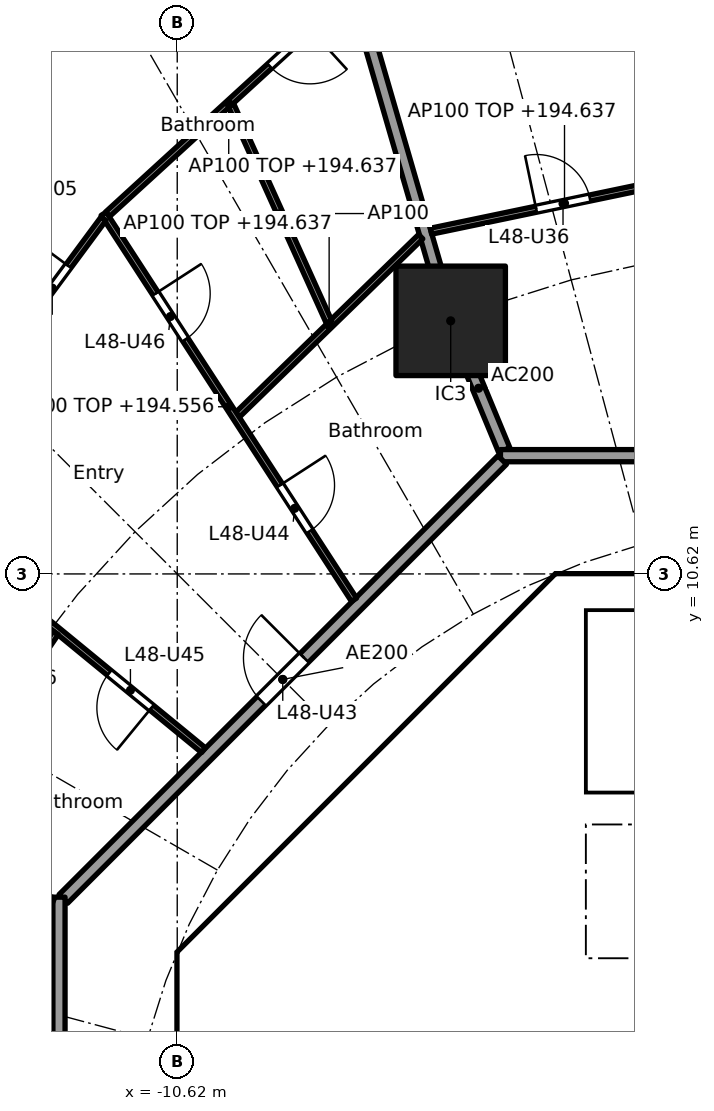
"""IFC4 building model, lengths in metres.
Left out: names, types, materials, properties, quantities, classifications, styles, units other than length and angle.
Written with IfcOpenShell. Run it as: python <this file> out.ifc"""

import sys

from ifc_helpers import new_model, si_unit, direction, frame, frame_2d, origin, origin_2d, place, context, subcontext, project, spatial, polyline, rectangle, outline, extrude, element, fill, save


model = new_model("IFC4")
c1 = context("Model", 3, precision=1e-05, world=origin(), true_north=direction((0.0, 1.0)))
c2 = subcontext(c1, "Body", "Model", "MODEL_VIEW")
j1 = project(units=[si_unit("LENGTHUNIT", "METRE"), si_unit("PLANEANGLEUNIT", "RADIAN")], contexts=[c1])
p1 = place(None, origin())
s1 = spatial("IfcSite", under=j1, at=p1, CompositionType="ELEMENT")
p2 = place(p1, origin())
s2 = spatial("IfcBuilding", under=s1, at=p2, CompositionType="ELEMENT")
p3 = place(p2, frame((0.0, 0.0, 191.8)))
s3 = spatial("IfcBuildingStorey", under=s2, at=p3, CompositionType="ELEMENT", Elevation=191.8)
p4 = place(p3, frame((-6.123, 14.782, 0.0), z_axis=(0.0, 0.0, 1.0), x_axis=(1.0, 0.0, 0.0)))
e1 = element("IfcColumn", 1, at=p4, inside=s3, PredefinedType="COLUMN", context=c2, shape_type="SweptSolid", body=[
    extrude(rectangle(XDim=1.8, YDim=1.8, at=origin_2d()), origin(), (0.0, 0.0, 1.0), 3.7),
])
p5 = place(p3, frame((-4.613, 9.988, 0.0), z_axis=(0.0, 0.0, 1.0), x_axis=(-0.707106781187, -0.707106781187, 0.0)))
e2 = element("IfcWall", 2, at=p5, inside=s3, PredefinedType="SHEAR", context=c2, shape_type="SweptSolid", body=[
    extrude(rectangle(XDim=7.602, YDim=0.6, at=frame_2d((3.801, 0.0))), origin(), (0.0, 0.0, 1.0), 3.44),
])
p6 = place(p5, frame((0.351, 0.0, 0.0)))
e3 = element("IfcOpeningElement", 3, at=p6, cuts=e2, PredefinedType="OPENING", context=c2, shape_type="SweptSolid", body=[
    extrude(rectangle(XDim=1.1, YDim=2.1, at=frame_2d((0.55, 1.05))), frame((0.0, 0.31, 0.0), z_axis=(0.0, -1.0, 0.0), x_axis=(1.0, 0.0, 0.0)), (0.0, 0.0, 1.0), 0.62),
])
p7 = place(p3, frame((-10.325, 3.801, 0.0), z_axis=(0.0, 0.0, 1.0), x_axis=(0.0, -1.0, 0.0)))
e4 = element("IfcWall", 4, at=p7, inside=s3, PredefinedType="SHEAR", context=c2, shape_type="SweptSolid", body=[
    extrude(rectangle(XDim=7.602, YDim=0.6, at=frame_2d((3.801, 0.0))), origin(), (0.0, 0.0, 1.0), 3.44),
])
p8 = place(p7, frame((0.651, 0.0, 0.0)))
e5 = element("IfcOpeningElement", 5, at=p8, cuts=e4, PredefinedType="OPENING", context=c2, shape_type="SweptSolid", body=[
    extrude(rectangle(XDim=1.5, YDim=2.1, at=frame_2d((0.75, 1.05))), frame((0.0, 0.31, 0.0), z_axis=(0.0, -1.0, 0.0), x_axis=(1.0, 0.0, 0.0)), (0.0, 0.0, 1.0), 0.62),
])
p9 = place(p7, frame((5.451, 0.0, 0.0)))
e6 = element("IfcOpeningElement", 6, at=p9, cuts=e4, PredefinedType="OPENING", context=c2, shape_type="SweptSolid", body=[
    extrude(rectangle(XDim=1.5, YDim=2.1, at=frame_2d((0.75, 1.05))), frame((0.0, 0.31, 0.0), z_axis=(0.0, -1.0, 0.0), x_axis=(1.0, 0.0, 0.0)), (0.0, 0.0, 1.0), 0.62),
])
p10 = place(p3, frame((-6.2, 4.3, 0.0), z_axis=(0.0, 0.0, 1.0), x_axis=(0.0, 1.0, 0.0)))
e7 = element("IfcWall", 7, at=p10, inside=s3, PredefinedType="PARTITIONING", context=c2, shape_type="SweptSolid", body=[
    extrude(rectangle(XDim=3.527, YDim=0.15, at=frame_2d((1.763, 0.0))), origin(), (0.0, 0.0, 1.0), 3.44),
])
p11 = place(p10, frame((0.262, 0.0, 0.0)))
e8 = element("IfcOpeningElement", 8, at=p11, cuts=e7, PredefinedType="OPENING", context=c2, shape_type="SweptSolid", body=[
    extrude(rectangle(XDim=0.9, YDim=2.1, at=frame_2d((0.45, 1.05))), frame((0.0, 0.085, 0.0), z_axis=(0.0, -1.0, 0.0), x_axis=(1.0, 0.0, 0.0)), (0.0, 0.0, 1.0), 0.17),
])
p12 = place(p10, frame((2.138, 0.0, 0.0)))
e9 = element("IfcOpeningElement", 9, at=p12, cuts=e7, PredefinedType="OPENING", context=c2, shape_type="SweptSolid", body=[
    extrude(rectangle(XDim=0.9, YDim=2.1, at=frame_2d((0.45, 1.05))), frame((0.0, 0.085, 0.0), z_axis=(0.0, -1.0, 0.0), x_axis=(1.0, 0.0, 0.0)), (0.0, 0.0, 1.0), 0.17),
])
p13 = place(p3, frame((-4.0, 4.3, 0.0), z_axis=(0.0, 0.0, 1.0), x_axis=(0.0, 1.0, 0.0)))
e10 = element("IfcWall", 10, at=p13, inside=s3, PredefinedType="SOLIDWALL", context=c2, shape_type="SweptSolid", body=[
    extrude(rectangle(XDim=2.2, YDim=0.2, at=frame_2d((1.1, 0.0))), origin(), (0.0, 0.0, 1.0), 3.44),
])
p14 = place(p13, frame((0.55, 0.0, 0.0)))
e11 = element("IfcOpeningElement", 11, at=p14, cuts=e10, PredefinedType="OPENING", context=c2, shape_type="SweptSolid", body=[
    extrude(rectangle(XDim=1.1, YDim=2.1, at=frame_2d((0.55, 1.05))), frame((0.0, 0.11, 0.0), z_axis=(0.0, -1.0, 0.0), x_axis=(1.0, 0.0, 0.0)), (0.0, 0.0, 1.0), 0.22),
])
p15 = place(p3, origin())
e12 = element("IfcWall", 12, at=p15, inside=s3, PredefinedType="SHEAR", context=c2, shape_type="SweptSolid", body=[
    extrude(outline(polyline([(-10.2, 4.825), (-9.776, 4.401), (-10.025, 4.152), (-10.025, 3.801), (-10.625, 3.801), (-10.625, 4.401), (-10.2, 4.825)])), origin(), (0.0, 0.0, 1.0), 3.44),
])
p16 = place(p3, origin())
e13 = element("IfcWall", 13, at=p16, inside=s3, PredefinedType="SHEAR", context=c2, shape_type="SweptSolid", body=[
    extrude(outline(polyline([(-4.152, 10.025), (-4.401, 9.776), (-4.825, 10.2), (-4.401, 10.625), (4.401, 10.625), (4.825, 10.2), (4.401, 9.776), (4.152, 10.025), (-4.152, 10.025)])), origin(), (0.0, 0.0, 1.0), 3.44),
])
p17 = place(p3, frame((-10.025, 4.0, 0.0), z_axis=(0.0, 0.0, 1.0), x_axis=(1.0, 0.0, 0.0)))
e14 = element("IfcWall", 14, at=p17, inside=s3, PredefinedType="PARTITIONING", context=c2, shape_type="SweptSolid", body=[
    extrude(rectangle(XDim=3.325, YDim=0.2, at=frame_2d((1.662, 0.0))), origin(), (0.0, 0.0, 1.0), 3.44),
])
p18 = place(p3, frame((-8.301, 5.8, 0.0), z_axis=(0.0, 0.0, 1.0), x_axis=(1.0, 0.0, 0.0)))
e15 = element("IfcWall", 15, at=p18, inside=s3, PredefinedType="PARTITIONING", context=c2, shape_type="SweptSolid", body=[
    extrude(rectangle(XDim=2.026, YDim=0.15, at=frame_2d((1.013, 0.0))), origin(), (0.0, 0.0, 1.0), 3.44),
])
p19 = place(p3, origin())
e16 = element("IfcWall", 16, at=p19, inside=s3, PredefinedType="SOLIDWALL", context=c2, shape_type="SweptSolid", body=[
    extrude(outline(polyline([(-6.7, 4.3), (6.7, 4.3), (6.7, 2.1), (6.5, 2.1), (6.5, 4.1), (4.5, 4.1), (4.5, 2.1), (4.3, 2.1), (4.3, 4.1), (2.3, 4.1), (2.3, 2.1), (2.1, 2.1), (2.1, 4.1), (0.1, 4.1), (0.1, 2.1), (-0.1, 2.1), (-0.1, 4.1), (-2.1, 4.1), (-2.1, 2.1), (-2.3, 2.1), (-2.3, 4.1), (-6.5, 4.1), (-6.5, 2.1), (-6.7, 2.1), (-6.7, 4.3)])), origin(), (0.0, 0.0, 1.0), 3.44),
])
p20 = place(p3, origin())
e17 = element("IfcWall", 17, at=p20, inside=s3, PredefinedType="SOLIDWALL", context=c2, shape_type="SweptSolid", body=[
    extrude(outline(polyline([(-3.9, 7.025), (-4.1, 7.025), (-4.1, 10.025), (-3.9, 10.025), (-3.9, 7.025)])), origin(), (0.0, 0.0, 1.0), 3.44),
])
p21 = place(p3, origin())
e18 = element("IfcWall", 18, at=p21, inside=s3, PredefinedType="SOLIDWALL", context=c2, shape_type="SweptSolid", body=[
    extrude(outline(polyline([(4.1, 6.5), (-4.1, 6.5), (-4.1, 7.025), (4.1, 7.025), (4.1, 6.5)])), origin(), (0.0, 0.0, 1.0), 3.44),
])
p22 = place(p3, frame((-5.243, 12.657, 0.0), z_axis=(0.0, 0.0, 1.0), x_axis=(-0.382707856524, 0.923869415315, 0.0)))
e19 = element("IfcWall", 19, at=p22, inside=s3, PredefinedType="PARTITIONING", context=c2, shape_type="SweptSolid", body=[
    extrude(rectangle(XDim=2.2, YDim=0.2, at=frame_2d((1.1, 0.0))), origin(), (0.0, 0.0, 1.0), 3.44),
])
p23 = place(p3, frame((-6.137, 14.83, 0.0), z_axis=(0.0, 0.0, 1.0), x_axis=(-0.278461169897, 0.96044748782, 0.0)))
e20 = element("IfcWall", 20, at=p23, inside=s3, PredefinedType="PARTITIONING", context=c2, shape_type="SweptSolid", body=[
    extrude(rectangle(XDim=9.573, YDim=0.2, at=frame_2d((4.787, 0.0))), origin(), (0.0, 0.0, 1.0), 2.837),
])
p24 = place(p3, frame((5.104, 12.565, 0.0), z_axis=(0.0, 0.0, 1.0), x_axis=(-1.0, 0.0, 0.0)))
e21 = element("IfcWall", 21, at=p24, inside=s3, PredefinedType="PARTITIONING", context=c2, shape_type="SweptSolid", body=[
    extrude(rectangle(XDim=10.409, YDim=0.2, at=frame_2d((5.205, 0.0))), origin(), (0.0, 0.0, 1.0), 3.44),
])
p25 = place(p24, frame((1.185, 0.0, 0.0)))
e22 = element("IfcOpeningElement", 22, at=p25, cuts=e21, PredefinedType="OPENING", context=c2, shape_type="SweptSolid", body=[
    extrude(rectangle(XDim=1.0, YDim=2.1, at=frame_2d((0.5, 1.05))), frame((0.0, 0.11, 0.0), z_axis=(0.0, -1.0, 0.0), x_axis=(1.0, 0.0, 0.0)), (0.0, 0.0, 1.0), 0.22),
])
p26 = place(p3, frame((-5.275, 12.494, 0.0), z_axis=(0.0, 0.0, 1.0), x_axis=(-0.707106781187, -0.707106781187, 0.0)))
e23 = element("IfcWall", 23, at=p26, inside=s3, PredefinedType="PARTITIONING", context=c2, shape_type="SweptSolid", body=[
    extrude(rectangle(XDim=10.209, YDim=0.2, at=frame_2d((5.104, 0.0))), origin(), (0.0, 0.0, 1.0), 3.44),
])
p27 = place(p26, frame((4.604, 0.0, 0.0)))
e24 = element("IfcOpeningElement", 24, at=p27, cuts=e23, PredefinedType="OPENING", context=c2, shape_type="SweptSolid", body=[
    extrude(rectangle(XDim=1.0, YDim=2.1, at=frame_2d((0.5, 1.05))), frame((0.0, 0.11, 0.0), z_axis=(0.0, -1.0, 0.0), x_axis=(1.0, 0.0, 0.0)), (0.0, 0.0, 1.0), 0.22),
])
p28 = place(p3, frame((-12.565, 5.304, 0.0), z_axis=(0.0, 0.0, 1.0), x_axis=(0.0, -1.0, 0.0)))
e25 = element("IfcWall", 25, at=p28, inside=s3, PredefinedType="PARTITIONING", context=c2, shape_type="SweptSolid", body=[
    extrude(rectangle(XDim=10.409, YDim=0.2, at=frame_2d((5.205, 0.0))), origin(), (0.0, 0.0, 1.0), 3.44),
])
p29 = place(p3, frame((-2.056, 17.173, 0.0), z_axis=(0.0, 0.0, 1.0), x_axis=(-0.978902917122, -0.20432591331, 0.0)))
e26 = element("IfcWall", 26, at=p29, inside=s3, PredefinedType="PARTITIONING", context=c2, shape_type="SweptSolid", body=[
    extrude(rectangle(XDim=4.486, YDim=0.1, at=frame_2d((2.243, 0.0))), origin(), (0.0, 0.0, 1.0), 2.837),
])
p30 = place(p29, frame((1.818, 0.0, 0.0)))
e27 = element("IfcOpeningElement", 27, at=p30, cuts=e26, PredefinedType="OPENING", context=c2, shape_type="SweptSolid", body=[
    extrude(rectangle(XDim=0.9, YDim=2.1, at=frame_2d((0.45, 1.05))), frame((0.0, 0.06, 0.0), z_axis=(0.0, -1.0, 0.0), x_axis=(1.0, 0.0, 0.0)), (0.0, 0.0, 1.0), 0.12),
])
p31 = place(p3, frame((-6.616, 16.166, 0.0), z_axis=(0.0, 0.0, 1.0), x_axis=(-0.716919058692, -0.697156412352, 0.0)))
e28 = element("IfcWall", 28, at=p31, inside=s3, PredefinedType="PARTITIONING", context=c2, shape_type="SweptSolid", body=[
    extrude(rectangle(XDim=4.2, YDim=0.1, at=frame_2d((2.1, 0.0))), origin(), (0.0, 0.0, 1.0), 2.837),
])
p32 = place(p3, frame((-7.781, 20.178, 0.0), z_axis=(0.0, 0.0, 1.0), x_axis=(-0.73807320557, -0.674720640872, 0.0)))
e29 = element("IfcWall", 29, at=p32, inside=s3, PredefinedType="PARTITIONING", context=c2, shape_type="SweptSolid", body=[
    extrude(rectangle(XDim=5.399, YDim=0.1, at=frame_2d((2.699, 0.0))), origin(), (0.0, 0.0, 1.0), 2.837),
])
p33 = place(p32, frame((0.887, 0.0, 0.0)))
e30 = element("IfcOpeningElement", 30, at=p33, cuts=e29, PredefinedType="OPENING", context=c2, shape_type="SweptSolid", body=[
    extrude(rectangle(XDim=0.9, YDim=2.1, at=frame_2d((0.45, 1.05))), frame((0.0, 0.06, 0.0), z_axis=(0.0, -1.0, 0.0), x_axis=(1.0, 0.0, 0.0)), (0.0, 0.0, 1.0), 0.12),
])
p34 = place(p3, frame((-8.125, 14.765, 0.0), z_axis=(0.0, 0.0, 1.0), x_axis=(-0.411745679848, 0.911298795745, 0.0)))
e31 = element("IfcWall", 31, at=p34, inside=s3, PredefinedType="PARTITIONING", context=c2, shape_type="SweptSolid", body=[
    extrude(rectangle(XDim=3.909, YDim=0.1, at=frame_2d((1.955, 0.0))), origin(), (0.0, 0.0, 1.0), 3.44),
])
p35 = place(p3, frame((-7.712, 10.195, 0.0), z_axis=(0.0, 0.0, 1.0), x_axis=(-0.544179442551, 0.838968851809, 0.0)))
e32 = element("IfcWall", 32, at=p35, inside=s3, PredefinedType="PARTITIONING", context=c2, shape_type="SweptSolid", body=[
    extrude(rectangle(XDim=7.566, YDim=0.1, at=frame_2d((3.783, 0.0))), origin(), (0.0, 0.0, 1.0), 2.756),
])
p36 = place(p35, frame((1.343, 0.0, 0.0)))
e33 = element("IfcOpeningElement", 33, at=p36, cuts=e32, PredefinedType="OPENING", context=c2, shape_type="SweptSolid", body=[
    extrude(rectangle(XDim=0.9, YDim=2.1, at=frame_2d((0.45, 1.05))), frame((0.0, 0.06, 0.0), z_axis=(0.0, -1.0, 0.0), x_axis=(1.0, 0.0, 0.0)), (0.0, 0.0, 1.0), 0.12),
])
p37 = place(p35, frame((5.101, 0.0, 0.0)))
e34 = element("IfcOpeningElement", 34, at=p37, cuts=e32, PredefinedType="OPENING", context=c2, shape_type="SweptSolid", body=[
    extrude(rectangle(XDim=0.9, YDim=2.1, at=frame_2d((0.45, 1.05))), frame((0.0, 0.06, 0.0), z_axis=(0.0, -1.0, 0.0), x_axis=(1.0, 0.0, 0.0)), (0.0, 0.0, 1.0), 0.12),
])
p38 = place(p3, frame((-11.832, 16.461, 0.0), z_axis=(0.0, 0.0, 1.0), x_axis=(-0.594704483906, -0.803944386647, 0.0)))
e35 = element("IfcWall", 35, at=p38, inside=s3, PredefinedType="PARTITIONING", context=c2, shape_type="SweptSolid", body=[
    extrude(rectangle(XDim=5.672, YDim=0.1, at=frame_2d((2.836, 0.0))), origin(), (0.0, 0.0, 1.0), 2.837),
])
p39 = place(p38, frame((0.968, 0.0, 0.0)))
e36 = element("IfcOpeningElement", 36, at=p39, cuts=e35, PredefinedType="OPENING", context=c2, shape_type="SweptSolid", body=[
    extrude(rectangle(XDim=0.9, YDim=2.1, at=frame_2d((0.45, 1.05))), frame((0.0, 0.06, 0.0), z_axis=(0.0, -1.0, 0.0), x_axis=(1.0, 0.0, 0.0)), (0.0, 0.0, 1.0), 0.12),
])
p40 = place(p38, frame((3.804, 0.0, 0.0)))
e37 = element("IfcOpeningElement", 37, at=p40, cuts=e35, PredefinedType="OPENING", context=c2, shape_type="SweptSolid", body=[
    extrude(rectangle(XDim=0.9, YDim=2.1, at=frame_2d((0.45, 1.05))), frame((0.0, 0.06, 0.0), z_axis=(0.0, -1.0, 0.0), x_axis=(1.0, 0.0, 0.0)), (0.0, 0.0, 1.0), 0.12),
])
p41 = place(p3, frame((-10.189, 7.721, 0.0), z_axis=(0.0, 0.0, 1.0), x_axis=(-0.773121441079, 0.634258021112, 0.0)))
e38 = element("IfcWall", 38, at=p41, inside=s3, PredefinedType="PARTITIONING", context=c2, shape_type="SweptSolid", body=[
    extrude(rectangle(XDim=6.577, YDim=0.1, at=frame_2d((3.289, 0.0))), origin(), (0.0, 0.0, 1.0), 2.756),
])
p42 = place(p41, frame((1.104, 0.0, 0.0)))
e39 = element("IfcOpeningElement", 39, at=p42, cuts=e38, PredefinedType="OPENING", context=c2, shape_type="SweptSolid", body=[
    extrude(rectangle(XDim=0.9, YDim=2.1, at=frame_2d((0.45, 1.05))), frame((0.0, 0.06, 0.0), z_axis=(0.0, -1.0, 0.0), x_axis=(1.0, 0.0, 0.0)), (0.0, 0.0, 1.0), 0.12),
])
p43 = place(p41, frame((4.367, 0.0, 0.0)))
e40 = element("IfcOpeningElement", 40, at=p43, cuts=e38, PredefinedType="OPENING", context=c2, shape_type="SweptSolid", body=[
    extrude(rectangle(XDim=0.9, YDim=2.1, at=frame_2d((0.45, 1.05))), frame((0.0, 0.06, 0.0), z_axis=(0.0, -1.0, 0.0), x_axis=(1.0, 0.0, 0.0)), (0.0, 0.0, 1.0), 0.12),
])
p44 = place(p3, frame((-12.619, 9.65, 0.0), z_axis=(0.0, 0.0, 1.0), x_axis=(-0.561064907171, -0.827771810308, 0.0)))
e41 = element("IfcWall", 41, at=p44, inside=s3, PredefinedType="PARTITIONING", context=c2, shape_type="SweptSolid", body=[
    extrude(rectangle(XDim=4.159, YDim=0.1, at=frame_2d((2.079, 0.0))), origin(), (0.0, 0.0, 1.0), 3.44),
])
p45 = place(p3, frame((-12.657, 5.243, 0.0), z_axis=(0.0, 0.0, 1.0), x_axis=(-0.923864733477, 0.382719158442, 0.0)))
e42 = element("IfcWall", 42, at=p45, inside=s3, PredefinedType="PARTITIONING", context=c2, shape_type="SweptSolid", body=[
    extrude(rectangle(XDim=2.25, YDim=0.1, at=frame_2d((1.125, 0.0))), origin(), (0.0, 0.0, 1.0), 3.44),
])
p46 = place(p14, origin())
e43 = element("IfcDoor", 43, at=p46, inside=s3, OperationType="DOUBLE_DOOR_SLIDING", PredefinedType="DOOR", context=c2, shape_type="SweptSolid", body=[
    extrude(rectangle(XDim=1.1, YDim=2.1, at=frame_2d((0.55, 1.05))), frame((0.0, 0.025, 0.0), z_axis=(0.0, -1.0, 0.0), x_axis=(1.0, 0.0, 0.0)), (0.0, 0.0, 1.0), 0.05),
])
fill(e11, e43)
p47 = place(p11, origin())
e44 = element("IfcDoor", 44, at=p47, inside=s3, OperationType="SINGLE_SWING_RIGHT", PredefinedType="DOOR", context=c2, shape_type="SweptSolid", body=[
    extrude(rectangle(XDim=0.9, YDim=2.1, at=frame_2d((0.45, 1.05))), frame((0.0, 0.025, 0.0), z_axis=(0.0, -1.0, 0.0), x_axis=(1.0, 0.0, 0.0)), (0.0, 0.0, 1.0), 0.05),
])
fill(e8, e44)
p48 = place(p12, origin())
e45 = element("IfcDoor", 45, at=p48, inside=s3, OperationType="SINGLE_SWING_RIGHT", PredefinedType="DOOR", context=c2, shape_type="SweptSolid", body=[
    extrude(rectangle(XDim=0.9, YDim=2.1, at=frame_2d((0.45, 1.05))), frame((0.0, 0.025, 0.0), z_axis=(0.0, -1.0, 0.0), x_axis=(1.0, 0.0, 0.0)), (0.0, 0.0, 1.0), 0.05),
])
fill(e9, e45)
p49 = place(p8, origin())
e46 = element("IfcDoor", 46, at=p49, inside=s3, OperationType="DOUBLE_DOOR_SINGLE_SWING", PredefinedType="DOOR", context=c2, shape_type="SweptSolid", body=[
    extrude(rectangle(XDim=1.5, YDim=2.1, at=frame_2d((0.75, 1.05))), frame((0.0, 0.025, 0.0), z_axis=(0.0, -1.0, 0.0), x_axis=(1.0, 0.0, 0.0)), (0.0, 0.0, 1.0), 0.05),
])
fill(e5, e46)
p50 = place(p6, origin())
e47 = element("IfcDoor", 47, at=p50, inside=s3, OperationType="SINGLE_SWING_RIGHT", PredefinedType="DOOR", context=c2, shape_type="SweptSolid", body=[
    extrude(rectangle(XDim=1.1, YDim=2.1, at=frame_2d((0.55, 1.05))), frame((0.0, 0.025, 0.0), z_axis=(0.0, -1.0, 0.0), x_axis=(1.0, 0.0, 0.0)), (0.0, 0.0, 1.0), 0.05),
])
fill(e3, e47)
p51 = place(p30, frame((0.9, 0.0, 0.0), x_axis=(-1.0, 0.0, 0.0)))
e48 = element("IfcDoor", 48, at=p51, inside=s3, OperationType="SINGLE_SWING_LEFT", PredefinedType="DOOR", context=c2, shape_type="SweptSolid", body=[
    extrude(rectangle(XDim=0.9, YDim=2.1, at=frame_2d((0.45, 1.05))), frame((0.0, 0.025, 0.0), z_axis=(0.0, -1.0, 0.0), x_axis=(1.0, 0.0, 0.0)), (0.0, 0.0, 1.0), 0.05),
])
fill(e27, e48)
p52 = place(p27, frame((1.0, 0.0, 0.0), x_axis=(-1.0, 0.0, 0.0)))
e49 = element("IfcDoor", 49, at=p52, inside=s3, OperationType="SINGLE_SWING_RIGHT", PredefinedType="DOOR", context=c2, shape_type="SweptSolid", body=[
    extrude(rectangle(XDim=1.0, YDim=2.1, at=frame_2d((0.5, 1.05))), frame((0.0, 0.025, 0.0), z_axis=(0.0, -1.0, 0.0), x_axis=(1.0, 0.0, 0.0)), (0.0, 0.0, 1.0), 0.05),
])
fill(e24, e49)
p53 = place(p36, frame((0.9, 0.0, 0.0), x_axis=(-1.0, 0.0, 0.0)))
e50 = element("IfcDoor", 50, at=p53, inside=s3, OperationType="SINGLE_SWING_LEFT", PredefinedType="DOOR", context=c2, shape_type="SweptSolid", body=[
    extrude(rectangle(XDim=0.9, YDim=2.1, at=frame_2d((0.45, 1.05))), frame((0.0, 0.025, 0.0), z_axis=(0.0, -1.0, 0.0), x_axis=(1.0, 0.0, 0.0)), (0.0, 0.0, 1.0), 0.05),
])
fill(e33, e50)
p54 = place(p42, origin())
e51 = element("IfcDoor", 51, at=p54, inside=s3, OperationType="SINGLE_SWING_LEFT", PredefinedType="DOOR", context=c2, shape_type="SweptSolid", body=[
    extrude(rectangle(XDim=0.9, YDim=2.1, at=frame_2d((0.45, 1.05))), frame((0.0, 0.025, 0.0), z_axis=(0.0, -1.0, 0.0), x_axis=(1.0, 0.0, 0.0)), (0.0, 0.0, 1.0), 0.05),
])
fill(e39, e51)
p55 = place(p37, frame((0.9, 0.0, 0.0), x_axis=(-1.0, 0.0, 0.0)))
e52 = element("IfcDoor", 52, at=p55, inside=s3, OperationType="SINGLE_SWING_LEFT", PredefinedType="DOOR", context=c2, shape_type="SweptSolid", body=[
    extrude(rectangle(XDim=0.9, YDim=2.1, at=frame_2d((0.45, 1.05))), frame((0.0, 0.025, 0.0), z_axis=(0.0, -1.0, 0.0), x_axis=(1.0, 0.0, 0.0)), (0.0, 0.0, 1.0), 0.05),
])
fill(e34, e52)
p56 = place(p39, frame((0.9, 0.0, 0.0), x_axis=(-1.0, 0.0, 0.0)))
e53 = element("IfcDoor", 53, at=p56, inside=s3, OperationType="SINGLE_SWING_RIGHT", PredefinedType="DOOR", context=c2, shape_type="SweptSolid", body=[
    extrude(rectangle(XDim=0.9, YDim=2.1, at=frame_2d((0.45, 1.05))), frame((0.0, 0.025, 0.0), z_axis=(0.0, -1.0, 0.0), x_axis=(1.0, 0.0, 0.0)), (0.0, 0.0, 1.0), 0.05),
])
fill(e36, e53)
p57 = place(p33, origin())
e54 = element("IfcDoor", 54, at=p57, inside=s3, OperationType="SINGLE_SWING_LEFT", PredefinedType="DOOR", context=c2, shape_type="SweptSolid", body=[
    extrude(rectangle(XDim=0.9, YDim=2.1, at=frame_2d((0.45, 1.05))), frame((0.0, 0.025, 0.0), z_axis=(0.0, -1.0, 0.0), x_axis=(1.0, 0.0, 0.0)), (0.0, 0.0, 1.0), 0.05),
])
fill(e30, e54)
save(model, sys.argv[1])
